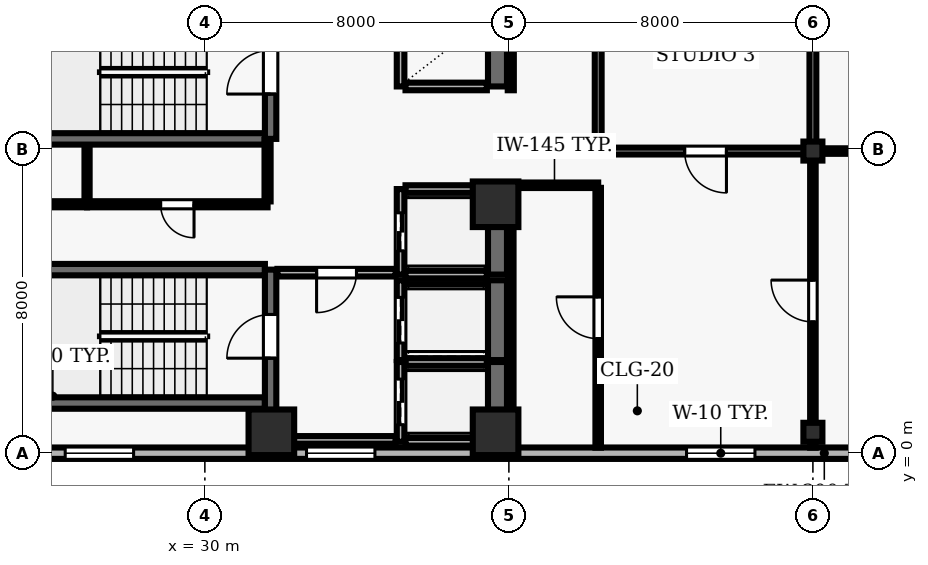
"""IFC4 building model, lengths in metres.
Left out: names, types, materials, properties, quantities, classifications, styles, units other than length and angle.
Written with IfcOpenShell. Run it as: python <this file> out.ifc"""

import sys

from ifc_helpers import new_model, si_unit, direction, frame, frame_2d, origin, origin_2d, place, context, subcontext, project, spatial, rectangle, hollow_rectangle, extrude, element, fill, save


model = new_model("IFC4")
c1 = context("Model", 3, precision=1e-05, world=origin(), true_north=direction((0.0, 1.0)))
c2 = subcontext(c1, "Body", "Model", "MODEL_VIEW")
j1 = project(units=[si_unit("LENGTHUNIT", "METRE"), si_unit("PLANEANGLEUNIT", "RADIAN")], contexts=[c1])
p1 = place(None, origin())
s1 = spatial("IfcSite", under=j1, at=p1, CompositionType="ELEMENT")
p2 = place(p1, origin())
s2 = spatial("IfcBuilding", under=s1, at=p2, CompositionType="ELEMENT")
p3 = place(p2, frame((0.0, 0.0, 138.5)))
s3 = spatial("IfcBuildingStorey", under=s2, at=p3, CompositionType="ELEMENT", Elevation=138.5)
for number, where, z_axis, x_axis in (
    (1, (31.75, 0.55, 0.0), (0.0, 0.0, 1.0), (1.0, 0.0, 0.0)),
    (2, (37.65, 0.55, 0.0), (0.0, 0.0, 1.0), (1.0, 0.0, 0.0)),
    (3, (37.65, 6.55, 0.0), (0.0, 0.0, 1.0), (1.0, 0.0, 0.0)),
):
    element("IfcColumn", number, at=place(p3, frame(where, z_axis=z_axis, x_axis=x_axis)), inside=s3, PredefinedType="COLUMN", context=c2, shape_type="SweptSolid", body=[
        extrude(rectangle(XDim=1.2, YDim=1.2, at=origin_2d()), origin(), (0.0, 0.0, 1.0), 3.9),
    ])
for number, where, z_axis, x_axis in (
    (4, (46.0, 0.55, 0.0), (0.0, 0.0, 1.0), (1.0, 0.0, 0.0)),
    (5, (46.0, 7.95, 0.0), (0.0, 0.0, 1.0), (1.0, 0.0, 0.0)),
):
    element("IfcColumn", number, at=place(p3, frame(where, z_axis=z_axis, x_axis=x_axis)), inside=s3, PredefinedType="COLUMN", context=c2, shape_type="SweptSolid", body=[
        extrude(hollow_rectangle(XDim=0.5, YDim=0.5, WallThickness=0.025, at=origin_2d()), origin(), (0.0, 0.0, 1.0), 3.9),
    ])
p4 = place(p3, frame((24.5, 0.0, 0.0), z_axis=(0.0, 0.0, 1.0), x_axis=(1.0, 0.0, 0.0)))
e6 = element("IfcWall", 6, at=p4, inside=s3, PredefinedType="SOLIDWALL", context=c2, shape_type="SweptSolid", body=[
    extrude(rectangle(XDim=43.6, YDim=0.3, at=frame_2d((21.8, 0.0))), origin(), (0.0, 0.0, 1.0), 3.69),
])
p5 = place(p4, frame((1.825, 0.0, 0.9)))
e7 = element("IfcOpeningElement", 7, at=p5, cuts=e6, PredefinedType="OPENING", context=c2, shape_type="SweptSolid", body=[
    extrude(rectangle(XDim=1.8, YDim=2.2, at=frame_2d((0.9, 1.1))), frame((0.0, 0.16, 0.0), z_axis=(0.0, -1.0, 0.0), x_axis=(1.0, 0.0, 0.0)), (0.0, 0.0, 1.0), 0.32),
])
p6 = place(p4, frame((8.175, 0.0, 0.9)))
e8 = element("IfcOpeningElement", 8, at=p6, cuts=e6, PredefinedType="OPENING", context=c2, shape_type="SweptSolid", body=[
    extrude(rectangle(XDim=1.8, YDim=2.2, at=frame_2d((0.9, 1.1))), frame((0.0, 0.16, 0.0), z_axis=(0.0, -1.0, 0.0), x_axis=(1.0, 0.0, 0.0)), (0.0, 0.0, 1.0), 0.32),
])
p7 = place(p4, frame((18.175, 0.0, 0.9)))
e9 = element("IfcOpeningElement", 9, at=p7, cuts=e6, PredefinedType="OPENING", context=c2, shape_type="SweptSolid", body=[
    extrude(rectangle(XDim=1.8, YDim=2.2, at=frame_2d((0.9, 1.1))), frame((0.0, 0.16, 0.0), z_axis=(0.0, -1.0, 0.0), x_axis=(1.0, 0.0, 0.0)), (0.0, 0.0, 1.0), 0.32),
])
p8 = place(p4, frame((23.625, 0.0, 0.9)))
e10 = element("IfcOpeningElement", 10, at=p8, cuts=e6, PredefinedType="OPENING", context=c2, shape_type="SweptSolid", body=[
    extrude(rectangle(XDim=1.8, YDim=2.2, at=frame_2d((0.9, 1.1))), frame((0.0, 0.16, 0.0), z_axis=(0.0, -1.0, 0.0), x_axis=(1.0, 0.0, 0.0)), (0.0, 0.0, 1.0), 0.32),
])
p9 = place(p4, frame((29.525, 0.0, 0.9)))
e11 = element("IfcOpeningElement", 11, at=p9, cuts=e6, PredefinedType="OPENING", context=c2, shape_type="SweptSolid", body=[
    extrude(rectangle(XDim=1.8, YDim=2.2, at=frame_2d((0.9, 1.1))), frame((0.0, 0.16, 0.0), z_axis=(0.0, -1.0, 0.0), x_axis=(1.0, 0.0, 0.0)), (0.0, 0.0, 1.0), 0.32),
])
for number, where, z_axis, x_axis in (
    (12, (31.58, 4.83, 0.0), (0.0, 0.0, 1.0), (-1.0, 0.0, 0.0)),
    (13, (23.22, 1.32, 0.0), (0.0, 0.0, 1.0), (1.0, 0.0, 0.0)),
):
    element("IfcWall", number, at=place(p3, frame(where, z_axis=z_axis, x_axis=x_axis)), inside=s3, PredefinedType="SHEAR", context=c2, shape_type="SweptSolid", body=[
        extrude(rectangle(XDim=8.36, YDim=0.3, at=frame_2d((4.18, 0.0))), origin(), (0.0, 0.0, 1.0), 3.69),
    ])
p10 = place(p3, frame((31.73, 0.96, 0.0), z_axis=(0.0, 0.0, 1.0), x_axis=(0.0, 1.0, 0.0)))
e14 = element("IfcWall", 14, at=p10, inside=s3, PredefinedType="SHEAR", context=c2, shape_type="SweptSolid", body=[
    extrude(rectangle(XDim=3.87, YDim=0.3, at=frame_2d((1.935, 0.0))), origin(), (0.0, 0.0, 1.0), 3.69),
])
p11 = place(p10, frame((1.54, 0.0, 0.0)))
e15 = element("IfcOpeningElement", 15, at=p11, cuts=e14, PredefinedType="OPENING", context=c2, shape_type="SweptSolid", body=[
    extrude(rectangle(XDim=1.15, YDim=2.15, at=frame_2d((0.575, 1.075))), frame((0.0, 0.16, 0.0), z_axis=(0.0, -1.0, 0.0), x_axis=(1.0, 0.0, 0.0)), (0.0, 0.0, 1.0), 0.32),
])
p12 = place(p3, frame((23.22, 8.27, 0.0), z_axis=(0.0, 0.0, 1.0), x_axis=(1.0, 0.0, 0.0)))
e16 = element("IfcWall", 16, at=p12, inside=s3, PredefinedType="SHEAR", context=c2, shape_type="SweptSolid", body=[
    extrude(rectangle(XDim=8.36, YDim=0.3, at=frame_2d((4.18, 0.0))), origin(), (0.0, 0.0, 1.0), 3.69),
])
p13 = place(p3, frame((31.73, 8.27, 0.0), z_axis=(0.0, 0.0, 1.0), x_axis=(0.0, 1.0, 0.0)))
e17 = element("IfcWall", 17, at=p13, inside=s3, PredefinedType="SHEAR", context=c2, shape_type="SweptSolid", body=[
    extrude(rectangle(XDim=3.51, YDim=0.3, at=frame_2d((1.755, 0.0))), origin(), (0.0, 0.0, 1.0), 3.69),
])
p14 = place(p13, frame((1.18, 0.0, 0.0)))
e18 = element("IfcOpeningElement", 18, at=p14, cuts=e17, PredefinedType="OPENING", context=c2, shape_type="SweptSolid", body=[
    extrude(rectangle(XDim=1.15, YDim=2.15, at=frame_2d((0.575, 1.075))), frame((0.0, 0.16, 0.0), z_axis=(0.0, -1.0, 0.0), x_axis=(1.0, 0.0, 0.0)), (0.0, 0.0, 1.0), 0.32),
])
p15 = place(p3, frame((35.15, 2.4, 0.0), z_axis=(0.0, 0.0, 1.0), x_axis=(0.0, -1.0, 0.0)))
e19 = element("IfcWall", 19, at=p15, inside=s3, PredefinedType="SOLIDWALL", context=c2, shape_type="SweptSolid", body=[
    extrude(rectangle(XDim=2.1, YDim=0.2, at=frame_2d((1.05, 0.0))), origin(), (0.0, 0.0, 1.0), 3.69),
])
p16 = place(p15, frame((0.45, 0.0, 0.0)))
e20 = element("IfcOpeningElement", 20, at=p16, cuts=e19, PredefinedType="OPENING", context=c2, shape_type="SweptSolid", body=[
    extrude(rectangle(XDim=1.2, YDim=2.15, at=frame_2d((0.6, 1.075))), frame((0.0, 0.11, 0.0), z_axis=(0.0, -1.0, 0.0), x_axis=(1.0, 0.0, 0.0)), (0.0, 0.0, 1.0), 0.22),
])
p17 = place(p3, frame((37.7, 0.3, 0.0), z_axis=(0.0, 0.0, 1.0), x_axis=(0.0, 1.0, 0.0)))
e21 = element("IfcWall", 21, at=p17, inside=s3, PredefinedType="SHEAR", context=c2, shape_type="SweptSolid", body=[
    extrude(rectangle(XDim=2.1, YDim=0.5, at=frame_2d((1.05, 0.0))), origin(), (0.0, 0.0, 1.0), 3.69),
])
for number, where, z_axis, x_axis in (
    (22, (35.28, 0.3, 0.0), (0.0, 0.0, 1.0), (1.0, 0.0, 0.0)),
    (23, (37.42, 2.4, 0.0), (0.0, 0.0, 1.0), (-1.0, 0.0, 0.0)),
):
    element("IfcWall", number, at=place(p3, frame(where, z_axis=z_axis, x_axis=x_axis)), inside=s3, PredefinedType="SOLIDWALL", context=c2, shape_type="SweptSolid", body=[
        extrude(rectangle(XDim=2.14, YDim=0.2, at=frame_2d((1.07, 0.0))), origin(), (0.0, 0.0, 1.0), 3.69),
    ])
p18 = place(p3, frame((35.15, 4.55, 0.0), z_axis=(0.0, 0.0, 1.0), x_axis=(0.0, -1.0, 0.0)))
e24 = element("IfcWall", 24, at=p18, inside=s3, PredefinedType="SOLIDWALL", context=c2, shape_type="SweptSolid", body=[
    extrude(rectangle(XDim=2.1, YDim=0.2, at=frame_2d((1.05, 0.0))), origin(), (0.0, 0.0, 1.0), 3.69),
])
p19 = place(p18, frame((0.45, 0.0, 0.0)))
e25 = element("IfcOpeningElement", 25, at=p19, cuts=e24, PredefinedType="OPENING", context=c2, shape_type="SweptSolid", body=[
    extrude(rectangle(XDim=1.2, YDim=2.15, at=frame_2d((0.6, 1.075))), frame((0.0, 0.11, 0.0), z_axis=(0.0, -1.0, 0.0), x_axis=(1.0, 0.0, 0.0)), (0.0, 0.0, 1.0), 0.22),
])
p20 = place(p3, frame((37.7, 2.45, 0.0), z_axis=(0.0, 0.0, 1.0), x_axis=(0.0, 1.0, 0.0)))
e26 = element("IfcWall", 26, at=p20, inside=s3, PredefinedType="SHEAR", context=c2, shape_type="SweptSolid", body=[
    extrude(rectangle(XDim=2.1, YDim=0.5, at=frame_2d((1.05, 0.0))), origin(), (0.0, 0.0, 1.0), 3.69),
])
p21 = place(p3, frame((37.42, 4.55, 0.0), z_axis=(0.0, 0.0, 1.0), x_axis=(-1.0, 0.0, 0.0)))
e27 = element("IfcWall", 27, at=p21, inside=s3, PredefinedType="SOLIDWALL", context=c2, shape_type="SweptSolid", body=[
    extrude(rectangle(XDim=2.14, YDim=0.2, at=frame_2d((1.07, 0.0))), origin(), (0.0, 0.0, 1.0), 3.69),
])
p22 = place(p3, frame((35.15, 6.95, 0.0), z_axis=(0.0, 0.0, 1.0), x_axis=(0.0, -1.0, 0.0)))
e28 = element("IfcWall", 28, at=p22, inside=s3, PredefinedType="SOLIDWALL", context=c2, shape_type="SweptSolid", body=[
    extrude(rectangle(XDim=2.25, YDim=0.2, at=frame_2d((1.125, 0.0))), origin(), (0.0, 0.0, 1.0), 3.69),
])
p23 = place(p22, frame((0.625, 0.0, 0.0)))
e29 = element("IfcOpeningElement", 29, at=p23, cuts=e28, PredefinedType="OPENING", context=c2, shape_type="SweptSolid", body=[
    extrude(rectangle(XDim=1.0, YDim=2.1, at=frame_2d((0.5, 1.05))), frame((0.0, 0.11, 0.0), z_axis=(0.0, -1.0, 0.0), x_axis=(1.0, 0.0, 0.0)), (0.0, 0.0, 1.0), 0.22),
])
p24 = place(p3, frame((37.7, 4.7, 0.0), z_axis=(0.0, 0.0, 1.0), x_axis=(0.0, 1.0, 0.0)))
e30 = element("IfcWall", 30, at=p24, inside=s3, PredefinedType="SHEAR", context=c2, shape_type="SweptSolid", body=[
    extrude(rectangle(XDim=2.25, YDim=0.5, at=frame_2d((1.125, 0.0))), origin(), (0.0, 0.0, 1.0), 3.69),
])
for number, where, z_axis, x_axis in (
    (31, (35.28, 4.7, 0.0), (0.0, 0.0, 1.0), (1.0, 0.0, 0.0)),
    (32, (37.42, 6.95, 0.0), (0.0, 0.0, 1.0), (-1.0, 0.0, 0.0)),
):
    element("IfcWall", number, at=place(p3, frame(where, z_axis=z_axis, x_axis=x_axis)), inside=s3, PredefinedType="SOLIDWALL", context=c2, shape_type="SweptSolid", body=[
        extrude(rectangle(XDim=2.14, YDim=0.2, at=frame_2d((1.07, 0.0))), origin(), (0.0, 0.0, 1.0), 3.69),
    ])
p25 = place(p3, frame((35.15, 11.55, 0.0), z_axis=(0.0, 0.0, 1.0), x_axis=(0.0, -1.0, 0.0)))
e33 = element("IfcWall", 33, at=p25, inside=s3, PredefinedType="SOLIDWALL", context=c2, shape_type="SweptSolid", body=[
    extrude(rectangle(XDim=1.9, YDim=0.2, at=frame_2d((0.95, 0.0))), origin(), (0.0, 0.0, 1.0), 3.69),
])
p26 = place(p3, frame((37.7, 9.65, 0.0), z_axis=(0.0, 0.0, 1.0), x_axis=(0.0, 1.0, 0.0)))
e34 = element("IfcWall", 34, at=p26, inside=s3, PredefinedType="SHEAR", context=c2, shape_type="SweptSolid", body=[
    extrude(rectangle(XDim=1.9, YDim=0.5, at=frame_2d((0.95, 0.0))), origin(), (0.0, 0.0, 1.0), 3.69),
])
p27 = place(p3, frame((35.28, 9.65, 0.0), z_axis=(0.0, 0.0, 1.0), x_axis=(1.0, 0.0, 0.0)))
e35 = element("IfcWall", 35, at=p27, inside=s3, PredefinedType="SOLIDWALL", context=c2, shape_type="SweptSolid", body=[
    extrude(rectangle(XDim=2.14, YDim=0.2, at=frame_2d((1.07, 0.0))), origin(), (0.0, 0.0, 1.0), 3.69),
])
p28 = place(p3, frame((26.9, 6.55, 0.0), z_axis=(0.0, 0.0, 1.0), x_axis=(-1.0, 0.0, 0.0)))
e36 = element("IfcWall", 36, at=p28, inside=s3, PredefinedType="PARTITIONING", context=c2, shape_type="SweptSolid", body=[
    extrude(rectangle(XDim=4.7, YDim=0.16, at=frame_2d((2.35, 0.0))), origin(), (0.0, 0.0, 1.0), 3.69),
])
p29 = place(p28, frame((1.91, 0.0, 0.0)))
e37 = element("IfcOpeningElement", 37, at=p29, cuts=e36, PredefinedType="OPENING", context=c2, shape_type="SweptSolid", body=[
    extrude(rectangle(XDim=0.88, YDim=2.1, at=frame_2d((0.44, 1.05))), frame((0.0, 0.09, 0.0), z_axis=(0.0, -1.0, 0.0), x_axis=(1.0, 0.0, 0.0)), (0.0, 0.0, 1.0), 0.18),
])
p30 = place(p3, frame((31.65, 0.35, 0.0), z_axis=(0.0, 0.0, 1.0), x_axis=(1.0, 0.0, 0.0)))
e38 = element("IfcWall", 38, at=p30, inside=s3, PredefinedType="SOLIDWALL", context=c2, shape_type="SweptSolid", body=[
    extrude(rectangle(XDim=3.37, YDim=0.2, at=frame_2d((1.685, 0.0))), origin(), (0.0, 0.0, 1.0), 3.69),
])
p31 = place(p3, frame((31.65, 6.55, 0.0), z_axis=(0.0, 0.0, 1.0), x_axis=(-1.0, 0.0, 0.0)))
e39 = element("IfcWall", 39, at=p31, inside=s3, PredefinedType="PARTITIONING", context=c2, shape_type="SweptSolid", body=[
    extrude(rectangle(XDim=4.75, YDim=0.16, at=frame_2d((2.375, 0.0))), origin(), (0.0, 0.0, 1.0), 3.69),
])
p32 = place(p31, frame((1.935, 0.0, 0.0)))
e40 = element("IfcOpeningElement", 40, at=p32, cuts=e39, PredefinedType="OPENING", context=c2, shape_type="SweptSolid", body=[
    extrude(rectangle(XDim=0.88, YDim=2.1, at=frame_2d((0.44, 1.05))), frame((0.0, 0.09, 0.0), z_axis=(0.0, -1.0, 0.0), x_axis=(1.0, 0.0, 0.0)), (0.0, 0.0, 1.0), 0.18),
])
p33 = place(p3, frame((35.02, 4.75, 0.0), z_axis=(0.0, 0.0, 1.0), x_axis=(-1.0, 0.0, 0.0)))
e41 = element("IfcWall", 41, at=p33, inside=s3, PredefinedType="SOLIDWALL", context=c2, shape_type="SweptSolid", body=[
    extrude(rectangle(XDim=3.11, YDim=0.2, at=frame_2d((1.555, 0.0))), origin(), (0.0, 0.0, 1.0), 3.69),
])
p34 = place(p33, frame((1.03, 0.0, 0.0)))
e42 = element("IfcOpeningElement", 42, at=p34, cuts=e41, PredefinedType="OPENING", context=c2, shape_type="SweptSolid", body=[
    extrude(rectangle(XDim=1.05, YDim=2.15, at=frame_2d((0.525, 1.075))), frame((0.0, 0.11, 0.0), z_axis=(0.0, -1.0, 0.0), x_axis=(1.0, 0.0, 0.0)), (0.0, 0.0, 1.0), 0.22),
])
p35 = place(p3, frame((38.05, 7.05, 0.0), z_axis=(0.0, 0.0, 1.0), x_axis=(1.0, 0.0, 0.0)))
e43 = element("IfcWall", 43, at=p35, inside=s3, PredefinedType="PARTITIONING", context=c2, shape_type="SweptSolid", body=[
    extrude(rectangle(XDim=2.3, YDim=0.145, at=frame_2d((1.15, 0.0))), origin(), (0.0, 0.0, 1.0), 3.69),
])
p36 = place(p3, frame((46.0, 7.95, 0.0), z_axis=(0.0, 0.0, 1.0), x_axis=(-1.0, 0.0, 0.0)))
e44 = element("IfcWall", 44, at=p36, inside=s3, PredefinedType="PARTITIONING", context=c2, shape_type="SweptSolid", body=[
    extrude(rectangle(XDim=5.65, YDim=0.18, at=frame_2d((2.825, 0.0))), origin(), (0.0, 0.0, 1.0), 3.073),
])
p37 = place(p36, frame((2.275, 0.0, 0.0)))
e45 = element("IfcOpeningElement", 45, at=p37, cuts=e44, PredefinedType="OPENING", context=c2, shape_type="SweptSolid", body=[
    extrude(rectangle(XDim=1.1, YDim=2.15, at=frame_2d((0.55, 1.075))), frame((0.0, 0.1, 0.0), z_axis=(0.0, -1.0, 0.0), x_axis=(1.0, 0.0, 0.0)), (0.0, 0.0, 1.0), 0.2),
])
p38 = place(p3, frame((53.05, 7.95, 0.0), z_axis=(0.0, 0.0, 1.0), x_axis=(-1.0, 0.0, 0.0)))
e46 = element("IfcWall", 46, at=p38, inside=s3, PredefinedType="PARTITIONING", context=c2, shape_type="SweptSolid", body=[
    extrude(rectangle(XDim=7.05, YDim=0.145, at=frame_2d((3.525, 0.0))), origin(), (0.0, 0.0, 1.0), 3.073),
])
p39 = place(p3, frame((26.9, 6.625, 0.0), z_axis=(0.0, 0.0, 1.0), x_axis=(0.0, 1.0, 0.0)))
e47 = element("IfcWall", 47, at=p39, inside=s3, PredefinedType="PARTITIONING", context=c2, shape_type="SweptSolid", body=[
    extrude(rectangle(XDim=1.465, YDim=0.135, at=frame_2d((0.732, 0.0))), origin(), (0.0, 0.0, 1.0), 3.69),
])
p40 = place(p3, frame((31.65, 8.24, 0.0), z_axis=(0.0, 0.0, 1.0), x_axis=(0.0, -1.0, 0.0)))
e48 = element("IfcWall", 48, at=p40, inside=s3, PredefinedType="PARTITIONING", context=c2, shape_type="SweptSolid", body=[
    extrude(rectangle(XDim=1.615, YDim=0.16, at=frame_2d((0.808, 0.0))), origin(), (0.0, 0.0, 1.0), 3.69),
])
p41 = place(p3, frame((38.05, 6.982, 0.0), z_axis=(0.0, 0.0, 1.0), x_axis=(0.0, -1.0, 0.0)))
e49 = element("IfcWall", 49, at=p41, inside=s3, PredefinedType="PARTITIONING", context=c2, shape_type="SweptSolid", body=[
    extrude(rectangle(XDim=6.837, YDim=0.145, at=frame_2d((3.418, 0.0))), origin(), (0.0, 0.0, 1.0), 3.073),
])
p42 = place(p3, frame((38.05, 15.925, 0.0), z_axis=(0.0, 0.0, 1.0), x_axis=(0.0, -1.0, 0.0)))
e50 = element("IfcWall", 50, at=p42, inside=s3, PredefinedType="PARTITIONING", context=c2, shape_type="SweptSolid", body=[
    extrude(rectangle(XDim=6.375, YDim=0.16, at=frame_2d((3.188, 0.0))), origin(), (0.0, 0.0, 1.0), 3.073),
])
p43 = place(p3, frame((40.35, 0.145, 0.0), z_axis=(0.0, 0.0, 1.0), x_axis=(0.0, 1.0, 0.0)))
e51 = element("IfcWall", 51, at=p43, inside=s3, PredefinedType="PARTITIONING", context=c2, shape_type="SweptSolid", body=[
    extrude(rectangle(XDim=6.837, YDim=0.145, at=frame_2d((3.418, 0.0))), origin(), (0.0, 0.0, 1.0), 3.69),
])
p44 = place(p43, frame((2.869, 0.0, 0.0)))
e52 = element("IfcOpeningElement", 52, at=p44, cuts=e51, PredefinedType="OPENING", context=c2, shape_type="SweptSolid", body=[
    extrude(rectangle(XDim=1.1, YDim=2.15, at=frame_2d((0.55, 1.075))), frame((0.0, 0.083, 0.0), z_axis=(0.0, -1.0, 0.0), x_axis=(1.0, 0.0, 0.0)), (0.0, 0.0, 1.0), 0.165),
])
p45 = place(p3, frame((40.35, 8.035, 0.0), z_axis=(0.0, 0.0, 1.0), x_axis=(0.0, 1.0, 0.0)))
e53 = element("IfcWall", 53, at=p45, inside=s3, PredefinedType="PARTITIONING", context=c2, shape_type="SweptSolid", body=[
    extrude(rectangle(XDim=5.53, YDim=0.18, at=frame_2d((2.765, 0.0))), origin(), (0.0, 0.0, 1.0), 3.69),
])
p46 = place(p3, frame((46.0, 0.145, 0.0), z_axis=(0.0, 0.0, 1.0), x_axis=(0.0, 1.0, 0.0)))
e54 = element("IfcWall", 54, at=p46, inside=s3, PredefinedType="PARTITIONING", context=c2, shape_type="SweptSolid", body=[
    extrude(rectangle(XDim=7.72, YDim=0.145, at=frame_2d((3.86, 0.0))), origin(), (0.0, 0.0, 1.0), 3.073),
])
p47 = place(p46, frame((3.31, 0.0, 0.0)))
e55 = element("IfcOpeningElement", 55, at=p47, cuts=e54, PredefinedType="OPENING", context=c2, shape_type="SweptSolid", body=[
    extrude(rectangle(XDim=1.1, YDim=2.15, at=frame_2d((0.55, 1.075))), frame((0.0, 0.083, 0.0), z_axis=(0.0, -1.0, 0.0), x_axis=(1.0, 0.0, 0.0)), (0.0, 0.0, 1.0), 0.165),
])
p48 = place(p3, frame((46.0, 8.035, 0.0), z_axis=(0.0, 0.0, 1.0), x_axis=(0.0, 1.0, 0.0)))
e56 = element("IfcWall", 56, at=p48, inside=s3, PredefinedType="PARTITIONING", context=c2, shape_type="SweptSolid", body=[
    extrude(rectangle(XDim=5.53, YDim=0.18, at=frame_2d((2.765, 0.0))), origin(), (0.0, 0.0, 1.0), 3.073),
])
p49 = place(p5, origin())
e57 = element("IfcWindow", 57, at=p49, inside=s3, PartitioningType="SINGLE_PANEL", PredefinedType="WINDOW", context=c2, shape_type="SweptSolid", body=[
    extrude(rectangle(XDim=1.8, YDim=2.2, at=frame_2d((0.9, 1.1))), frame((0.0, 0.03, 0.0), z_axis=(0.0, -1.0, 0.0), x_axis=(1.0, 0.0, 0.0)), (0.0, 0.0, 1.0), 0.06),
])
fill(e7, e57)
p50 = place(p6, origin())
e58 = element("IfcWindow", 58, at=p50, inside=s3, PartitioningType="SINGLE_PANEL", PredefinedType="WINDOW", context=c2, shape_type="SweptSolid", body=[
    extrude(rectangle(XDim=1.8, YDim=2.2, at=frame_2d((0.9, 1.1))), frame((0.0, 0.03, 0.0), z_axis=(0.0, -1.0, 0.0), x_axis=(1.0, 0.0, 0.0)), (0.0, 0.0, 1.0), 0.06),
])
fill(e8, e58)
p51 = place(p7, origin())
e59 = element("IfcWindow", 59, at=p51, inside=s3, PartitioningType="SINGLE_PANEL", PredefinedType="WINDOW", context=c2, shape_type="SweptSolid", body=[
    extrude(rectangle(XDim=1.8, YDim=2.2, at=frame_2d((0.9, 1.1))), frame((0.0, 0.03, 0.0), z_axis=(0.0, -1.0, 0.0), x_axis=(1.0, 0.0, 0.0)), (0.0, 0.0, 1.0), 0.06),
])
fill(e9, e59)
p52 = place(p11, origin())
e60 = element("IfcDoor", 60, at=p52, inside=s3, OperationType="SINGLE_SWING_LEFT", PredefinedType="DOOR", context=c2, shape_type="SweptSolid", body=[
    extrude(rectangle(XDim=1.15, YDim=2.15, at=frame_2d((0.575, 1.075))), frame((0.0, 0.025, 0.0), z_axis=(0.0, -1.0, 0.0), x_axis=(1.0, 0.0, 0.0)), (0.0, 0.0, 1.0), 0.05),
])
fill(e15, e60)
p53 = place(p14, origin())
e61 = element("IfcDoor", 61, at=p53, inside=s3, OperationType="SINGLE_SWING_LEFT", PredefinedType="DOOR", context=c2, shape_type="SweptSolid", body=[
    extrude(rectangle(XDim=1.15, YDim=2.15, at=frame_2d((0.575, 1.075))), frame((0.0, 0.025, 0.0), z_axis=(0.0, -1.0, 0.0), x_axis=(1.0, 0.0, 0.0)), (0.0, 0.0, 1.0), 0.05),
])
fill(e18, e61)
p54 = place(p16, origin())
e62 = element("IfcDoor", 62, at=p54, inside=s3, OperationType="DOUBLE_DOOR_SLIDING", PredefinedType="DOOR", context=c2, shape_type="SweptSolid", body=[
    extrude(rectangle(XDim=1.2, YDim=2.15, at=frame_2d((0.6, 1.075))), frame((0.0, 0.025, 0.0), z_axis=(0.0, -1.0, 0.0), x_axis=(1.0, 0.0, 0.0)), (0.0, 0.0, 1.0), 0.05),
])
fill(e20, e62)
p55 = place(p19, origin())
e63 = element("IfcDoor", 63, at=p55, inside=s3, OperationType="DOUBLE_DOOR_SLIDING", PredefinedType="DOOR", context=c2, shape_type="SweptSolid", body=[
    extrude(rectangle(XDim=1.2, YDim=2.15, at=frame_2d((0.6, 1.075))), frame((0.0, 0.025, 0.0), z_axis=(0.0, -1.0, 0.0), x_axis=(1.0, 0.0, 0.0)), (0.0, 0.0, 1.0), 0.05),
])
fill(e25, e63)
p56 = place(p23, origin())
e64 = element("IfcDoor", 64, at=p56, inside=s3, OperationType="DOUBLE_DOOR_SLIDING", PredefinedType="DOOR", context=c2, shape_type="SweptSolid", body=[
    extrude(rectangle(XDim=1.0, YDim=2.1, at=frame_2d((0.5, 1.05))), frame((0.0, 0.025, 0.0), z_axis=(0.0, -1.0, 0.0), x_axis=(1.0, 0.0, 0.0)), (0.0, 0.0, 1.0), 0.05),
])
fill(e29, e64)
p57 = place(p34, origin())
e65 = element("IfcDoor", 65, at=p57, inside=s3, OperationType="SINGLE_SWING_RIGHT", PredefinedType="DOOR", context=c2, shape_type="SweptSolid", body=[
    extrude(rectangle(XDim=1.05, YDim=2.15, at=frame_2d((0.525, 1.075))), frame((0.0, 0.025, 0.0), z_axis=(0.0, -1.0, 0.0), x_axis=(1.0, 0.0, 0.0)), (0.0, 0.0, 1.0), 0.05),
])
fill(e42, e65)
p58 = place(p32, origin())
e66 = element("IfcDoor", 66, at=p58, inside=s3, OperationType="SINGLE_SWING_LEFT", PredefinedType="DOOR", context=c2, shape_type="SweptSolid", body=[
    extrude(rectangle(XDim=0.88, YDim=2.1, at=frame_2d((0.44, 1.05))), frame((0.0, 0.025, 0.0), z_axis=(0.0, -1.0, 0.0), x_axis=(1.0, 0.0, 0.0)), (0.0, 0.0, 1.0), 0.05),
])
fill(e40, e66)
p59 = place(p37, origin())
e67 = element("IfcDoor", 67, at=p59, inside=s3, OperationType="SINGLE_SWING_LEFT", PredefinedType="DOOR", context=c2, shape_type="SweptSolid", body=[
    extrude(rectangle(XDim=1.1, YDim=2.15, at=frame_2d((0.55, 1.075))), frame((0.0, 0.025, 0.0), z_axis=(0.0, -1.0, 0.0), x_axis=(1.0, 0.0, 0.0)), (0.0, 0.0, 1.0), 0.05),
])
fill(e45, e67)
p60 = place(p47, origin())
e68 = element("IfcDoor", 68, at=p60, inside=s3, OperationType="SINGLE_SWING_RIGHT", PredefinedType="DOOR", context=c2, shape_type="SweptSolid", body=[
    extrude(rectangle(XDim=1.1, YDim=2.15, at=frame_2d((0.55, 1.075))), frame((0.0, 0.025, 0.0), z_axis=(0.0, -1.0, 0.0), x_axis=(1.0, 0.0, 0.0)), (0.0, 0.0, 1.0), 0.05),
])
fill(e55, e68)
p61 = place(p44, origin())
e69 = element("IfcDoor", 69, at=p61, inside=s3, OperationType="SINGLE_SWING_RIGHT", PredefinedType="DOOR", context=c2, shape_type="SweptSolid", body=[
    extrude(rectangle(XDim=1.1, YDim=2.15, at=frame_2d((0.55, 1.075))), frame((0.0, 0.025, 0.0), z_axis=(0.0, -1.0, 0.0), x_axis=(1.0, 0.0, 0.0)), (0.0, 0.0, 1.0), 0.05),
])
fill(e52, e69)
save(model, sys.argv[1])
